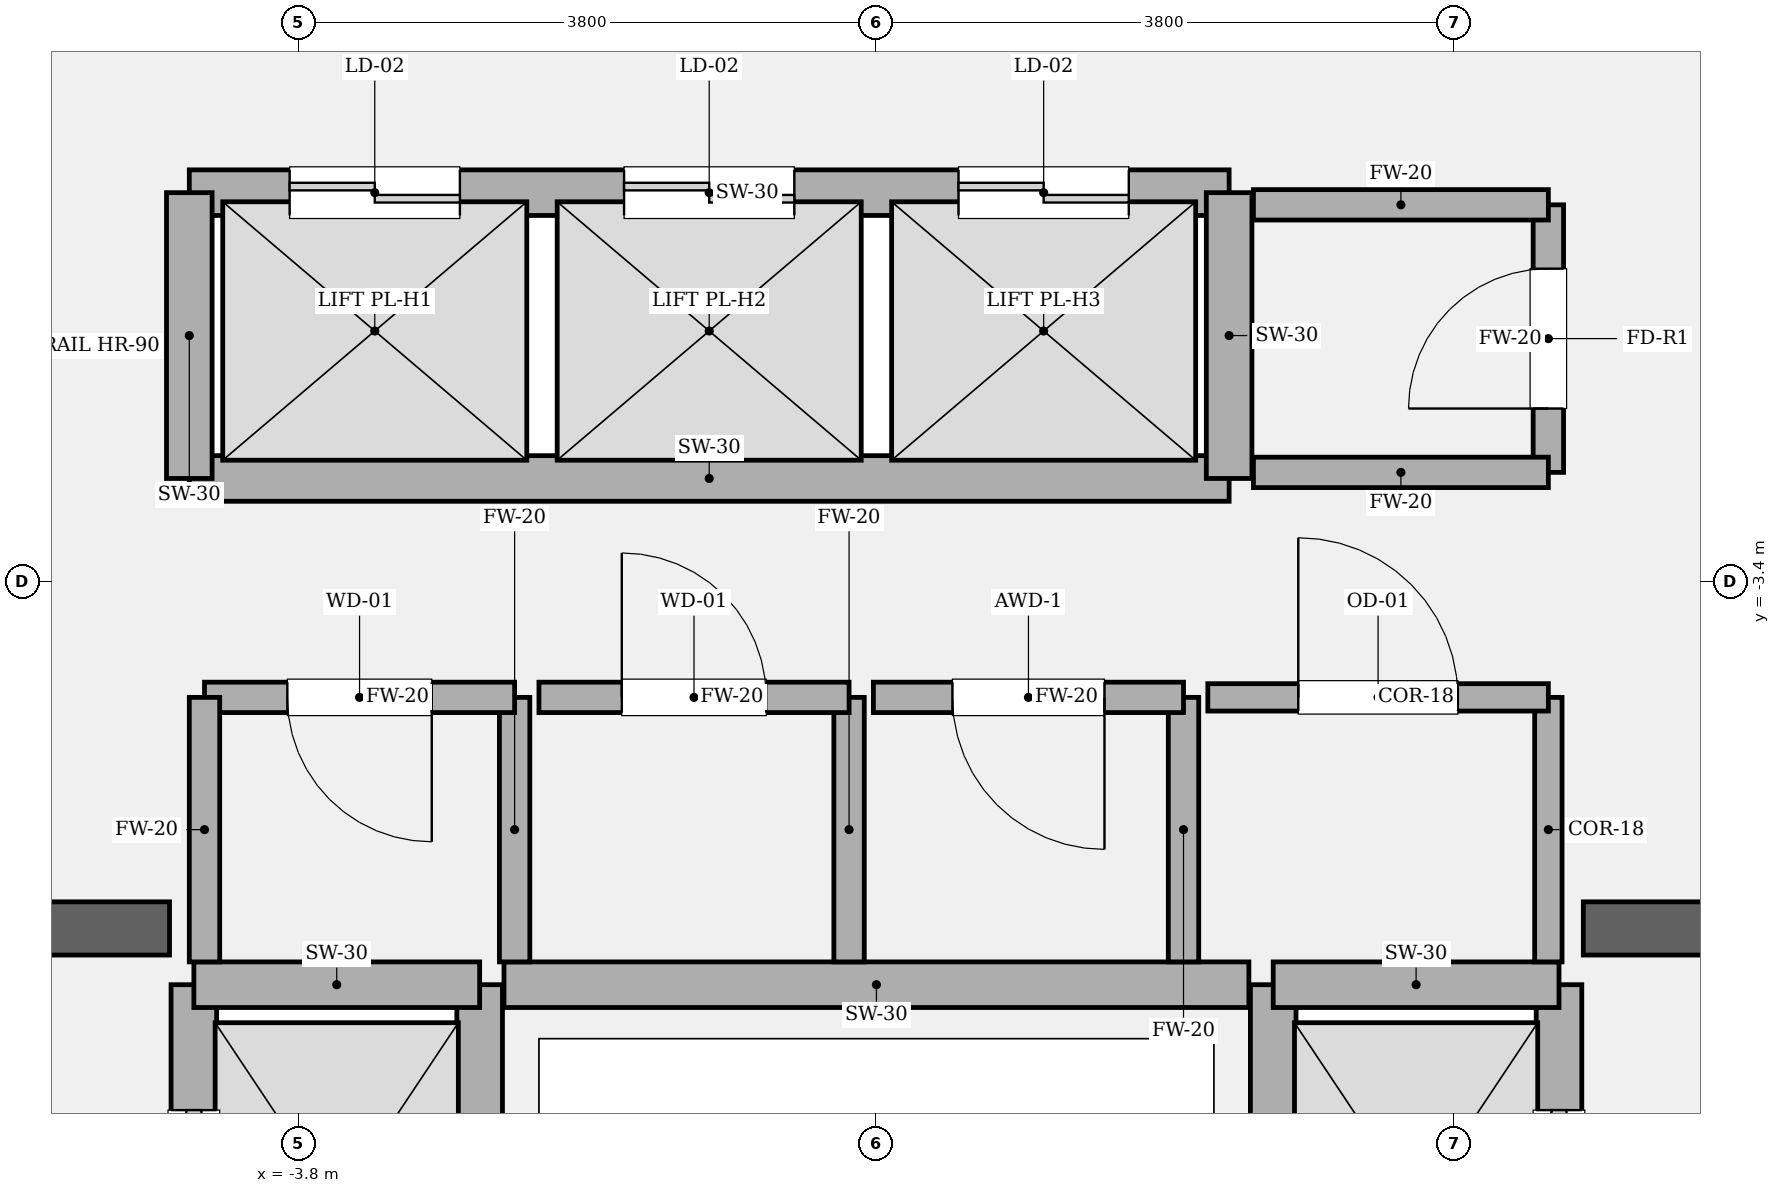
"""IFC4 building model, lengths in metres.
Left out: names, types, materials, properties, quantities, classifications, styles, units other than length and angle.
Written with IfcOpenShell. Run it as: python <this file> out.ifc"""

import sys

from ifc_helpers import new_model, si_unit, direction, frame, frame_2d, origin, place, context, subcontext, project, spatial, rectangle, extrude, element, fill, save


model = new_model("IFC4")
c1 = context("Model", 3, precision=1e-05, world=origin(), true_north=direction((0.0, 1.0)))
c2 = subcontext(c1, "Body", "Model", "MODEL_VIEW")
j1 = project(units=[si_unit("LENGTHUNIT", "METRE"), si_unit("PLANEANGLEUNIT", "RADIAN")], contexts=[c1])
p1 = place(None, origin())
s1 = spatial("IfcSite", under=j1, at=p1, CompositionType="ELEMENT")
p2 = place(p1, origin())
s2 = spatial("IfcBuilding", under=s1, at=p2, CompositionType="ELEMENT")
p3 = place(p2, frame((0.0, 0.0, 255.45)))
s3 = spatial("IfcBuildingStorey", under=s2, at=p3, CompositionType="ELEMENT", Elevation=255.45)
p4 = place(p3, frame((-9.925, -5.68, 0.0), z_axis=(0.0, 0.0, 1.0), x_axis=(1.0, 0.0, 0.0)))
e1 = element("IfcWall", 1, at=p4, inside=s3, PredefinedType="SOLIDWALL", context=c2, shape_type="SweptSolid", body=[
    extrude(rectangle(XDim=5.275, YDim=0.35, at=frame_2d((2.638, 0.0))), origin(), (0.0, 0.0, 1.0), 4.05),
])
p5 = place(p4, frame((1.385, 0.0, 0.0)))
e2 = element("IfcOpeningElement", 2, at=p5, cuts=e1, PredefinedType="OPENING", context=c2, shape_type="SweptSolid", body=[
    extrude(rectangle(XDim=1.18, YDim=2.2, at=frame_2d((0.59, 1.1))), frame((0.0, 0.185, 0.0), z_axis=(0.0, -1.0, 0.0), x_axis=(1.0, 0.0, 0.0)), (0.0, 0.0, 1.0), 0.37),
])
p6 = place(p3, frame((4.65, -5.68, 0.0), z_axis=(0.0, 0.0, 1.0), x_axis=(1.0, 0.0, 0.0)))
e3 = element("IfcWall", 3, at=p6, inside=s3, PredefinedType="SOLIDWALL", context=c2, shape_type="SweptSolid", body=[
    extrude(rectangle(XDim=5.275, YDim=0.35, at=frame_2d((2.638, 0.0))), origin(), (0.0, 0.0, 1.0), 4.05),
])
p7 = place(p6, frame((2.71, 0.0, 0.0)))
e4 = element("IfcOpeningElement", 4, at=p7, cuts=e3, PredefinedType="OPENING", context=c2, shape_type="SweptSolid", body=[
    extrude(rectangle(XDim=1.18, YDim=2.2, at=frame_2d((0.59, 1.1))), frame((0.0, 0.185, 0.0), z_axis=(0.0, -1.0, 0.0), x_axis=(1.0, 0.0, 0.0)), (0.0, 0.0, 1.0), 0.37),
])
p8 = place(p3, frame((-4.49, -8.82, 0.0), z_axis=(0.0, 0.0, 1.0), x_axis=(0.0, 1.0, 0.0)))
e5 = element("IfcWall", 5, at=p8, inside=s3, PredefinedType="SOLIDWALL", context=c2, shape_type="SweptSolid", body=[
    extrude(rectangle(XDim=2.77, YDim=0.3, at=frame_2d((1.385, 0.0))), origin(), (0.0, 0.0, 1.0), 3.85),
])
p9 = place(p8, frame((0.825, 0.0, 0.0)))
e6 = element("IfcOpeningElement", 6, at=p9, cuts=e5, PredefinedType="OPENING", context=c2, shape_type="SweptSolid", body=[
    extrude(rectangle(XDim=1.12, YDim=2.25, at=frame_2d((0.56, 1.125))), frame((0.0, 0.16, 0.0), z_axis=(0.0, -1.0, 0.0), x_axis=(1.0, 0.0, 0.0)), (0.0, 0.0, 1.0), 0.32),
])
p10 = place(p3, frame((-2.61, -8.82, 0.0), z_axis=(0.0, 0.0, 1.0), x_axis=(0.0, 1.0, 0.0)))
e7 = element("IfcWall", 7, at=p10, inside=s3, PredefinedType="SOLIDWALL", context=c2, shape_type="SweptSolid", body=[
    extrude(rectangle(XDim=2.77, YDim=0.3, at=frame_2d((1.385, 0.0))), origin(), (0.0, 0.0, 1.0), 3.85),
])
p11 = place(p3, frame((-4.49, -6.05, 0.0), z_axis=(0.0, 0.0, 1.0), x_axis=(1.0, 0.0, 0.0)))
e8 = element("IfcWall", 8, at=p11, inside=s3, PredefinedType="SOLIDWALL", context=c2, shape_type="SweptSolid", body=[
    extrude(rectangle(XDim=1.88, YDim=0.3, at=frame_2d((0.94, 0.0))), origin(), (0.0, 0.0, 1.0), 3.85),
])
p12 = place(p3, frame((4.49, -8.82, 0.0), z_axis=(0.0, 0.0, 1.0), x_axis=(0.0, 1.0, 0.0)))
e9 = element("IfcWall", 9, at=p12, inside=s3, PredefinedType="SOLIDWALL", context=c2, shape_type="SweptSolid", body=[
    extrude(rectangle(XDim=2.77, YDim=0.3, at=frame_2d((1.385, 0.0))), origin(), (0.0, 0.0, 1.0), 3.85),
])
p13 = place(p12, frame((0.825, 0.0, 0.0)))
e10 = element("IfcOpeningElement", 10, at=p13, cuts=e9, PredefinedType="OPENING", context=c2, shape_type="SweptSolid", body=[
    extrude(rectangle(XDim=1.12, YDim=2.25, at=frame_2d((0.56, 1.125))), frame((0.0, 0.16, 0.0), z_axis=(0.0, -1.0, 0.0), x_axis=(1.0, 0.0, 0.0)), (0.0, 0.0, 1.0), 0.32),
])
p14 = place(p3, frame((2.61, -8.82, 0.0), z_axis=(0.0, 0.0, 1.0), x_axis=(0.0, 1.0, 0.0)))
e11 = element("IfcWall", 11, at=p14, inside=s3, PredefinedType="SOLIDWALL", context=c2, shape_type="SweptSolid", body=[
    extrude(rectangle(XDim=2.77, YDim=0.3, at=frame_2d((1.385, 0.0))), origin(), (0.0, 0.0, 1.0), 3.85),
])
p15 = place(p3, frame((2.61, -6.05, 0.0), z_axis=(0.0, 0.0, 1.0), x_axis=(1.0, 0.0, 0.0)))
e12 = element("IfcWall", 12, at=p15, inside=s3, PredefinedType="SOLIDWALL", context=c2, shape_type="SweptSolid", body=[
    extrude(rectangle(XDim=1.88, YDim=0.3, at=frame_2d((0.94, 0.0))), origin(), (0.0, 0.0, 1.0), 3.85),
])
p16 = place(p3, frame((-4.52, -0.84, 0.0), z_axis=(0.0, 0.0, 1.0), x_axis=(1.0, 0.0, 0.0)))
e13 = element("IfcWall", 13, at=p16, inside=s3, PredefinedType="SOLIDWALL", context=c2, shape_type="SweptSolid", body=[
    extrude(rectangle(XDim=6.84, YDim=0.3, at=frame_2d((3.42, 0.0))), origin(), (0.0, 0.0, 1.0), 3.85),
])
p17 = place(p16, frame((0.66, 0.0, 0.0)))
e14 = element("IfcOpeningElement", 14, at=p17, cuts=e13, PredefinedType="OPENING", context=c2, shape_type="SweptSolid", body=[
    extrude(rectangle(XDim=1.12, YDim=2.25, at=frame_2d((0.56, 1.125))), frame((0.0, 0.16, 0.0), z_axis=(0.0, -1.0, 0.0), x_axis=(1.0, 0.0, 0.0)), (0.0, 0.0, 1.0), 0.32),
])
p18 = place(p16, frame((2.86, 0.0, 0.0)))
e15 = element("IfcOpeningElement", 15, at=p18, cuts=e13, PredefinedType="OPENING", context=c2, shape_type="SweptSolid", body=[
    extrude(rectangle(XDim=1.12, YDim=2.25, at=frame_2d((0.56, 1.125))), frame((0.0, 0.16, 0.0), z_axis=(0.0, -1.0, 0.0), x_axis=(1.0, 0.0, 0.0)), (0.0, 0.0, 1.0), 0.32),
])
p19 = place(p16, frame((5.06, 0.0, 0.0)))
e16 = element("IfcOpeningElement", 16, at=p19, cuts=e13, PredefinedType="OPENING", context=c2, shape_type="SweptSolid", body=[
    extrude(rectangle(XDim=1.12, YDim=2.25, at=frame_2d((0.56, 1.125))), frame((0.0, 0.16, 0.0), z_axis=(0.0, -1.0, 0.0), x_axis=(1.0, 0.0, 0.0)), (0.0, 0.0, 1.0), 0.32),
])
p20 = place(p3, frame((-4.52, -2.72, 0.0), z_axis=(0.0, 0.0, 1.0), x_axis=(1.0, 0.0, 0.0)))
e17 = element("IfcWall", 17, at=p20, inside=s3, PredefinedType="SOLIDWALL", context=c2, shape_type="SweptSolid", body=[
    extrude(rectangle(XDim=6.84, YDim=0.3, at=frame_2d((3.42, 0.0))), origin(), (0.0, 0.0, 1.0), 3.85),
])
for number, where, z_axis, x_axis in (
    (18, (-4.52, -2.72, 0.0), (0.0, 0.0, 1.0), (0.0, 1.0, 0.0)),
    (19, (2.32, -2.72, 0.0), (0.0, 0.0, 1.0), (0.0, 1.0, 0.0)),
):
    element("IfcWall", number, at=place(p3, frame(where, z_axis=z_axis, x_axis=x_axis)), inside=s3, PredefinedType="SOLIDWALL", context=c2, shape_type="SweptSolid", body=[
        extrude(rectangle(XDim=1.88, YDim=0.3, at=frame_2d((0.94, 0.0))), origin(), (0.0, 0.0, 1.0), 3.85),
    ])
p21 = place(p3, frame((-2.45, -6.05, 0.0), z_axis=(0.0, 0.0, 1.0), x_axis=(1.0, 0.0, 0.0)))
e20 = element("IfcWall", 20, at=p21, inside=s3, PredefinedType="SOLIDWALL", context=c2, shape_type="SweptSolid", body=[
    extrude(rectangle(XDim=4.9, YDim=0.3, at=frame_2d((2.45, 0.0))), origin(), (0.0, 0.0, 1.0), 3.85),
])
p22 = place(p3, frame((-2.38, -5.9, 0.0), z_axis=(0.0, 0.0, 1.0), x_axis=(0.0, 1.0, 0.0)))
e21 = element("IfcWall", 21, at=p22, inside=s3, PredefinedType="SOLIDWALL", context=c2, shape_type="SweptSolid", body=[
    extrude(rectangle(XDim=1.74, YDim=0.2, at=frame_2d((0.87, 0.0))), origin(), (0.0, 0.0, 1.0), 3.85),
])
p23 = place(p3, frame((-2.38, -4.16, 0.0), z_axis=(0.0, 0.0, 1.0), x_axis=(-1.0, 0.0, 0.0)))
e22 = element("IfcWall", 22, at=p23, inside=s3, PredefinedType="SOLIDWALL", context=c2, shape_type="SweptSolid", body=[
    extrude(rectangle(XDim=2.04, YDim=0.2, at=frame_2d((1.02, 0.0))), origin(), (0.0, 0.0, 1.0), 3.85),
])
p24 = place(p23, frame((0.545, 0.0, 0.0)))
e23 = element("IfcOpeningElement", 23, at=p24, cuts=e22, PredefinedType="OPENING", context=c2, shape_type="SweptSolid", body=[
    extrude(rectangle(XDim=0.95, YDim=2.15, at=frame_2d((0.475, 1.075))), frame((0.0, 0.11, 0.0), z_axis=(0.0, -1.0, 0.0), x_axis=(1.0, 0.0, 0.0)), (0.0, 0.0, 1.0), 0.22),
])
for number, where, z_axis, x_axis in (
    (24, (-4.42, -4.16, 0.0), (0.0, 0.0, 1.0), (0.0, -1.0, 0.0)),
    (25, (-0.18, -5.9, 0.0), (0.0, 0.0, 1.0), (0.0, 1.0, 0.0)),
):
    element("IfcWall", number, at=place(p3, frame(where, z_axis=z_axis, x_axis=x_axis)), inside=s3, PredefinedType="SOLIDWALL", context=c2, shape_type="SweptSolid", body=[
        extrude(rectangle(XDim=1.74, YDim=0.2, at=frame_2d((0.87, 0.0))), origin(), (0.0, 0.0, 1.0), 3.85),
    ])
p25 = place(p3, frame((-0.18, -4.16, 0.0), z_axis=(0.0, 0.0, 1.0), x_axis=(-1.0, 0.0, 0.0)))
e26 = element("IfcWall", 26, at=p25, inside=s3, PredefinedType="SOLIDWALL", context=c2, shape_type="SweptSolid", body=[
    extrude(rectangle(XDim=2.04, YDim=0.2, at=frame_2d((1.02, 0.0))), origin(), (0.0, 0.0, 1.0), 3.85),
])
p26 = place(p25, frame((0.545, 0.0, 0.0)))
e27 = element("IfcOpeningElement", 27, at=p26, cuts=e26, PredefinedType="OPENING", context=c2, shape_type="SweptSolid", body=[
    extrude(rectangle(XDim=0.95, YDim=2.15, at=frame_2d((0.475, 1.075))), frame((0.0, 0.11, 0.0), z_axis=(0.0, -1.0, 0.0), x_axis=(1.0, 0.0, 0.0)), (0.0, 0.0, 1.0), 0.22),
])
p27 = place(p3, frame((2.02, -5.9, 0.0), z_axis=(0.0, 0.0, 1.0), x_axis=(0.0, 1.0, 0.0)))
e28 = element("IfcWall", 28, at=p27, inside=s3, PredefinedType="SOLIDWALL", context=c2, shape_type="SweptSolid", body=[
    extrude(rectangle(XDim=1.74, YDim=0.2, at=frame_2d((0.87, 0.0))), origin(), (0.0, 0.0, 1.0), 3.85),
])
p28 = place(p3, frame((2.02, -4.16, 0.0), z_axis=(0.0, 0.0, 1.0), x_axis=(-1.0, 0.0, 0.0)))
e29 = element("IfcWall", 29, at=p28, inside=s3, PredefinedType="SOLIDWALL", context=c2, shape_type="SweptSolid", body=[
    extrude(rectangle(XDim=2.04, YDim=0.2, at=frame_2d((1.02, 0.0))), origin(), (0.0, 0.0, 1.0), 3.85),
])
p29 = place(p28, frame((0.52, 0.0, 0.0)))
e30 = element("IfcOpeningElement", 30, at=p29, cuts=e29, PredefinedType="OPENING", context=c2, shape_type="SweptSolid", body=[
    extrude(rectangle(XDim=1.0, YDim=2.15, at=frame_2d((0.5, 1.075))), frame((0.0, 0.11, 0.0), z_axis=(0.0, -1.0, 0.0), x_axis=(1.0, 0.0, 0.0)), (0.0, 0.0, 1.0), 0.22),
])
p30 = place(p3, frame((4.42, -5.9, 0.0), z_axis=(0.0, 0.0, 1.0), x_axis=(0.0, 1.0, 0.0)))
e31 = element("IfcWall", 31, at=p30, inside=s3, PredefinedType="PARTITIONING", context=c2, shape_type="SweptSolid", body=[
    extrude(rectangle(XDim=1.74, YDim=0.18, at=frame_2d((0.87, 0.0))), origin(), (0.0, 0.0, 1.0), 3.85),
])
p31 = place(p3, frame((4.42, -4.16, 0.0), z_axis=(0.0, 0.0, 1.0), x_axis=(-1.0, 0.0, 0.0)))
e32 = element("IfcWall", 32, at=p31, inside=s3, PredefinedType="PARTITIONING", context=c2, shape_type="SweptSolid", body=[
    extrude(rectangle(XDim=2.24, YDim=0.18, at=frame_2d((1.12, 0.0))), origin(), (0.0, 0.0, 1.0), 3.85),
])
p32 = place(p31, frame((0.595, 0.0, 0.0)))
e33 = element("IfcOpeningElement", 33, at=p32, cuts=e32, PredefinedType="OPENING", context=c2, shape_type="SweptSolid", body=[
    extrude(rectangle(XDim=1.05, YDim=2.2, at=frame_2d((0.525, 1.1))), frame((0.0, 0.1, 0.0), z_axis=(0.0, -1.0, 0.0), x_axis=(1.0, 0.0, 0.0)), (0.0, 0.0, 1.0), 0.2),
])
p33 = place(p3, frame((4.42, -2.68, 0.0), z_axis=(0.0, 0.0, 1.0), x_axis=(0.0, 1.0, 0.0)))
e34 = element("IfcWall", 34, at=p33, inside=s3, PredefinedType="SOLIDWALL", context=c2, shape_type="SweptSolid", body=[
    extrude(rectangle(XDim=1.76, YDim=0.2, at=frame_2d((0.88, 0.0))), origin(), (0.0, 0.0, 1.0), 3.85),
])
p34 = place(p33, frame((0.42, 0.0, 0.0)))
e35 = element("IfcOpeningElement", 35, at=p34, cuts=e34, PredefinedType="OPENING", context=c2, shape_type="SweptSolid", body=[
    extrude(rectangle(XDim=0.92, YDim=2.1, at=frame_2d((0.46, 1.05))), frame((0.0, 0.11, 0.0), z_axis=(0.0, -1.0, 0.0), x_axis=(1.0, 0.0, 0.0)), (0.0, 0.0, 1.0), 0.22),
])
for number, where, z_axis, x_axis in (
    (36, (4.42, -0.92, 0.0), (0.0, 0.0, 1.0), (-1.0, 0.0, 0.0)),
    (37, (2.48, -2.68, 0.0), (0.0, 0.0, 1.0), (1.0, 0.0, 0.0)),
):
    element("IfcWall", number, at=place(p3, frame(where, z_axis=z_axis, x_axis=x_axis)), inside=s3, PredefinedType="SOLIDWALL", context=c2, shape_type="SweptSolid", body=[
        extrude(rectangle(XDim=1.94, YDim=0.2, at=frame_2d((0.97, 0.0))), origin(), (0.0, 0.0, 1.0), 3.85),
    ])
p35 = place(p9, origin())
e38 = element("IfcDoor", 38, at=p35, inside=s3, OperationType="SLIDING_TO_LEFT", PredefinedType="DOOR", context=c2, shape_type="SweptSolid", body=[
    extrude(rectangle(XDim=1.12, YDim=2.25, at=frame_2d((0.56, 1.125))), frame((0.0, 0.025, 0.0), z_axis=(0.0, -1.0, 0.0), x_axis=(1.0, 0.0, 0.0)), (0.0, 0.0, 1.0), 0.05),
])
fill(e6, e38)
p36 = place(p13, origin())
e39 = element("IfcDoor", 39, at=p36, inside=s3, OperationType="SLIDING_TO_RIGHT", PredefinedType="DOOR", context=c2, shape_type="SweptSolid", body=[
    extrude(rectangle(XDim=1.12, YDim=2.25, at=frame_2d((0.56, 1.125))), frame((0.0, 0.025, 0.0), z_axis=(0.0, -1.0, 0.0), x_axis=(1.0, 0.0, 0.0)), (0.0, 0.0, 1.0), 0.05),
])
fill(e10, e39)
p37 = place(p17, origin())
e40 = element("IfcDoor", 40, at=p37, inside=s3, OperationType="DOUBLE_DOOR_SLIDING", PredefinedType="DOOR", context=c2, shape_type="SweptSolid", body=[
    extrude(rectangle(XDim=1.12, YDim=2.25, at=frame_2d((0.56, 1.125))), frame((0.0, 0.025, 0.0), z_axis=(0.0, -1.0, 0.0), x_axis=(1.0, 0.0, 0.0)), (0.0, 0.0, 1.0), 0.05),
])
fill(e14, e40)
p38 = place(p18, origin())
e41 = element("IfcDoor", 41, at=p38, inside=s3, OperationType="DOUBLE_DOOR_SLIDING", PredefinedType="DOOR", context=c2, shape_type="SweptSolid", body=[
    extrude(rectangle(XDim=1.12, YDim=2.25, at=frame_2d((0.56, 1.125))), frame((0.0, 0.025, 0.0), z_axis=(0.0, -1.0, 0.0), x_axis=(1.0, 0.0, 0.0)), (0.0, 0.0, 1.0), 0.05),
])
fill(e15, e41)
p39 = place(p19, origin())
e42 = element("IfcDoor", 42, at=p39, inside=s3, OperationType="DOUBLE_DOOR_SLIDING", PredefinedType="DOOR", context=c2, shape_type="SweptSolid", body=[
    extrude(rectangle(XDim=1.12, YDim=2.25, at=frame_2d((0.56, 1.125))), frame((0.0, 0.025, 0.0), z_axis=(0.0, -1.0, 0.0), x_axis=(1.0, 0.0, 0.0)), (0.0, 0.0, 1.0), 0.05),
])
fill(e16, e42)
p40 = place(p24, origin())
e43 = element("IfcDoor", 43, at=p40, inside=s3, OperationType="SINGLE_SWING_LEFT", PredefinedType="DOOR", context=c2, shape_type="SweptSolid", body=[
    extrude(rectangle(XDim=0.95, YDim=2.15, at=frame_2d((0.475, 1.075))), frame((0.0, 0.025, 0.0), z_axis=(0.0, -1.0, 0.0), x_axis=(1.0, 0.0, 0.0)), (0.0, 0.0, 1.0), 0.05),
])
fill(e23, e43)
p41 = place(p26, origin())
e44 = element("IfcDoor", 44, at=p41, inside=s3, OperationType="SINGLE_SWING_RIGHT", PredefinedType="DOOR", context=c2, shape_type="SweptSolid", body=[
    extrude(rectangle(XDim=0.95, YDim=2.15, at=frame_2d((0.475, 1.075))), frame((0.0, 0.025, 0.0), z_axis=(0.0, -1.0, 0.0), x_axis=(1.0, 0.0, 0.0)), (0.0, 0.0, 1.0), 0.05),
])
fill(e27, e44)
p42 = place(p29, origin())
e45 = element("IfcDoor", 45, at=p42, inside=s3, OperationType="SINGLE_SWING_LEFT", PredefinedType="DOOR", context=c2, shape_type="SweptSolid", body=[
    extrude(rectangle(XDim=1.0, YDim=2.15, at=frame_2d((0.5, 1.075))), frame((0.0, 0.025, 0.0), z_axis=(0.0, -1.0, 0.0), x_axis=(1.0, 0.0, 0.0)), (0.0, 0.0, 1.0), 0.05),
])
fill(e30, e45)
p43 = place(p32, origin())
e46 = element("IfcDoor", 46, at=p43, inside=s3, OperationType="SINGLE_SWING_RIGHT", PredefinedType="DOOR", context=c2, shape_type="SweptSolid", body=[
    extrude(rectangle(XDim=1.05, YDim=2.2, at=frame_2d((0.525, 1.1))), frame((0.0, 0.025, 0.0), z_axis=(0.0, -1.0, 0.0), x_axis=(1.0, 0.0, 0.0)), (0.0, 0.0, 1.0), 0.05),
])
fill(e33, e46)
p44 = place(p34, origin())
e47 = element("IfcDoor", 47, at=p44, inside=s3, OperationType="SINGLE_SWING_LEFT", PredefinedType="DOOR", context=c2, shape_type="SweptSolid", body=[
    extrude(rectangle(XDim=0.92, YDim=2.1, at=frame_2d((0.46, 1.05))), frame((0.0, 0.025, 0.0), z_axis=(0.0, -1.0, 0.0), x_axis=(1.0, 0.0, 0.0)), (0.0, 0.0, 1.0), 0.05),
])
fill(e35, e47)
save(model, sys.argv[1])
